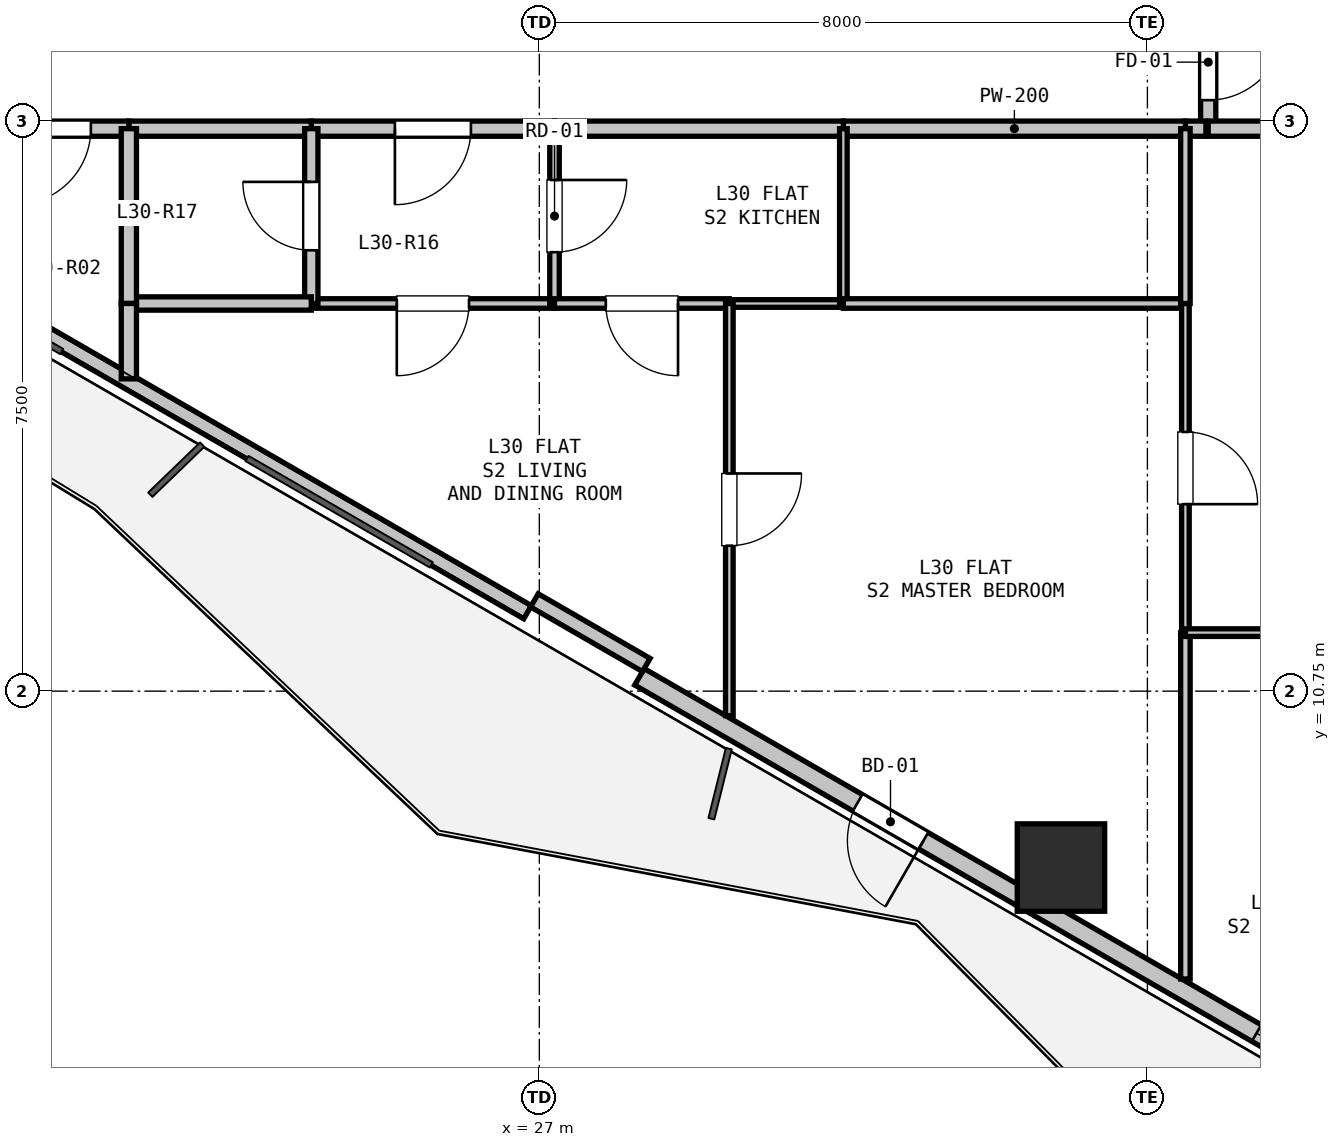
"""IFC4 building model, lengths in metres.
Left out: names, types, materials, properties, quantities, classifications, styles, units other than length and angle.
Written with IfcOpenShell. Run it as: python <this file> out.ifc"""

import sys

from ifc_helpers import new_model, si_unit, direction, frame, frame_2d, origin, origin_2d, place, context, subcontext, project, spatial, rectangle, hollow_rectangle, extrude, element, fill, save


model = new_model("IFC4")
c1 = context("Model", 3, precision=1e-05, world=origin(), true_north=direction((0.0, 1.0)))
c2 = subcontext(c1, "Body", "Model", "MODEL_VIEW")
j1 = project(units=[si_unit("LENGTHUNIT", "METRE"), si_unit("PLANEANGLEUNIT", "RADIAN")], contexts=[c1])
p1 = place(None, origin())
s1 = spatial("IfcSite", under=j1, at=p1, CompositionType="ELEMENT")
p2 = place(p1, origin())
s2 = spatial("IfcBuilding", under=s1, at=p2, CompositionType="ELEMENT")
p3 = place(p2, frame((0.0, 0.0, 109.8)))
s3 = spatial("IfcBuildingStorey", under=s2, at=p3, CompositionType="ELEMENT", Elevation=109.8)
p4 = place(p3, frame((33.863, 8.429, 0.0), z_axis=(0.0, 0.0, 1.0), x_axis=(1.0, 0.0, 0.0)))
e1 = element("IfcColumn", 1, at=p4, inside=s3, PredefinedType="COLUMN", context=c2, shape_type="SweptSolid", body=[
    extrude(hollow_rectangle(XDim=1.15, YDim=1.15, WallThickness=0.032, at=origin_2d()), origin(), (0.0, 0.0, 1.0), 3.3),
])
p5 = place(p3, frame((38.649, 4.973, 0.0), z_axis=(0.0, 0.0, 1.0), x_axis=(-0.866023023012, 0.500004123596, 0.0)))
e2 = element("IfcWall", 2, at=p5, inside=s3, PredefinedType="SOLIDWALL", context=c2, shape_type="SweptSolid", body=[
    extrude(rectangle(XDim=11.93, YDim=0.25, at=frame_2d((5.965, 0.0))), origin(), (0.0, 0.0, 1.0), 2.67),
])
p6 = place(p5, frame((7.616, 0.0, 0.0)))
e3 = element("IfcOpeningElement", 3, at=p6, cuts=e2, PredefinedType="OPENING", context=c2, shape_type="SweptSolid", body=[
    extrude(rectangle(XDim=1.0, YDim=2.1, at=frame_2d((0.5, 1.05))), frame((0.0, 0.135, 0.0), z_axis=(0.0, -1.0, 0.0), x_axis=(1.0, 0.0, 0.0)), (0.0, 0.0, 1.0), 0.27),
])
p7 = place(p5, frame((1.355, 0.0, 0.9)))
e4 = element("IfcOpeningElement", 4, at=p7, cuts=e2, PredefinedType="OPENING", context=c2, shape_type="SweptSolid", body=[
    extrude(rectangle(XDim=1.2, YDim=1.4, at=frame_2d((0.6, 0.7))), frame((0.0, 0.135, 0.0), z_axis=(0.0, -1.0, 0.0), x_axis=(1.0, 0.0, 0.0)), (0.0, 0.0, 1.0), 0.27),
])
p8 = place(p3, frame((26.845, 11.788, 0.0), z_axis=(0.0, 0.0, 1.0), x_axis=(-0.866027010039, 0.499997217876, 0.0)))
e5 = element("IfcWall", 5, at=p8, inside=s3, PredefinedType="PARAPET", context=c2, shape_type="SweptSolid", body=[
    extrude(rectangle(XDim=11.229, YDim=0.2, at=frame_2d((5.615, 0.0))), origin(), (0.0, 0.0, 1.0), 0.2),
])
p9 = place(p3, frame((28.407, 11.094, 0.0), z_axis=(0.0, 0.0, 1.0), x_axis=(-0.86605165483, 0.499954529098, 0.0)))
e6 = element("IfcWall", 6, at=p9, inside=s3, PredefinedType="PARAPET", context=c2, shape_type="SweptSolid", body=[
    extrude(rectangle(XDim=1.7, YDim=0.2, at=frame_2d((0.85, 0.0))), origin(), (0.0, 0.0, 1.0), 2.67),
])
p10 = place(p3, frame((35.8, 19.9, 0.0), z_axis=(0.0, 0.0, 1.0), x_axis=(0.0, -1.0, 0.0)))
e7 = element("IfcWall", 7, at=p10, inside=s3, PredefinedType="PARTITIONING", context=c2, shape_type="SweptSolid", body=[
    extrude(rectangle(XDim=1.75, YDim=0.2, at=frame_2d((0.875, 0.0))), origin(), (0.0, 0.0, 1.0), 3.05),
])
p11 = place(p10, frame((0.375, 0.0, 0.0)))
e8 = element("IfcOpeningElement", 8, at=p11, cuts=e7, PredefinedType="OPENING", context=c2, shape_type="SweptSolid", body=[
    extrude(rectangle(XDim=1.0, YDim=2.15, at=frame_2d((0.5, 1.075))), frame((0.0, 0.11, 0.0), z_axis=(0.0, -1.0, 0.0), x_axis=(1.0, 0.0, 0.0)), (0.0, 0.0, 1.0), 0.22),
])
p12 = place(p3, frame((35.77, 18.15, 0.0), z_axis=(0.0, 0.0, 1.0), x_axis=(-1.0, 0.0, 0.0)))
e9 = element("IfcWall", 9, at=p12, inside=s3, PredefinedType="PARTITIONING", context=c2, shape_type="SweptSolid", body=[
    extrude(rectangle(XDim=0.27, YDim=0.2, at=frame_2d((0.135, 0.0))), origin(), (0.0, 0.0, 1.0), 3.05),
])
p13 = place(p3, frame((35.5, 18.15, 0.0), z_axis=(0.0, 0.0, 1.0), x_axis=(-1.0, 0.0, 0.0)))
e10 = element("IfcWall", 10, at=p13, inside=s3, PredefinedType="PARTITIONING", context=c2, shape_type="SweptSolid", body=[
    extrude(rectangle(XDim=4.5, YDim=0.2, at=frame_2d((2.25, 0.0))), origin(), (0.0, 0.0, 1.0), 3.05),
])
p14 = place(p3, frame((31.0, 18.15, 0.0), z_axis=(0.0, 0.0, 1.0), x_axis=(-1.0, 0.0, 0.0)))
e11 = element("IfcWall", 11, at=p14, inside=s3, PredefinedType="PARTITIONING", context=c2, shape_type="SweptSolid", body=[
    extrude(rectangle(XDim=3.8, YDim=0.2, at=frame_2d((1.9, 0.0))), origin(), (0.0, 0.0, 1.0), 3.05),
])
p15 = place(p3, frame((27.2, 18.15, 0.0), z_axis=(0.0, 0.0, 1.0), x_axis=(-1.0, 0.0, 0.0)))
e12 = element("IfcWall", 12, at=p15, inside=s3, PredefinedType="PARTITIONING", context=c2, shape_type="SweptSolid", body=[
    extrude(rectangle(XDim=3.2, YDim=0.2, at=frame_2d((1.6, 0.0))), origin(), (0.0, 0.0, 1.0), 2.423),
])
p16 = place(p15, frame((1.1, 0.0, 0.0)))
e13 = element("IfcOpeningElement", 13, at=p16, cuts=e12, PredefinedType="OPENING", context=c2, shape_type="SweptSolid", body=[
    extrude(rectangle(XDim=1.0, YDim=2.15, at=frame_2d((0.5, 1.075))), frame((0.0, 0.11, 0.0), z_axis=(0.0, -1.0, 0.0), x_axis=(1.0, 0.0, 0.0)), (0.0, 0.0, 1.0), 0.22),
])
p17 = place(p3, frame((24.0, 18.15, 0.0), z_axis=(0.0, 0.0, 1.0), x_axis=(-1.0, 0.0, 0.0)))
e14 = element("IfcWall", 14, at=p17, inside=s3, PredefinedType="PARTITIONING", context=c2, shape_type="SweptSolid", body=[
    extrude(rectangle(XDim=2.4, YDim=0.2, at=frame_2d((1.2, 0.0))), origin(), (0.0, 0.0, 1.0), 2.423),
])
p18 = place(p3, frame((21.6, 18.15, 0.0), z_axis=(0.0, 0.0, 1.0), x_axis=(-1.0, 0.0, 0.0)))
e15 = element("IfcWall", 15, at=p18, inside=s3, PredefinedType="PARTITIONING", context=c2, shape_type="SweptSolid", body=[
    extrude(rectangle(XDim=2.0, YDim=0.2, at=frame_2d((1.0, 0.0))), origin(), (0.0, 0.0, 1.0), 3.05),
])
p19 = place(p18, frame((0.5, 0.0, 0.0)))
e16 = element("IfcOpeningElement", 16, at=p19, cuts=e15, PredefinedType="OPENING", context=c2, shape_type="SweptSolid", body=[
    extrude(rectangle(XDim=1.0, YDim=2.15, at=frame_2d((0.5, 1.075))), frame((0.0, 0.11, 0.0), z_axis=(0.0, -1.0, 0.0), x_axis=(1.0, 0.0, 0.0)), (0.0, 0.0, 1.0), 0.22),
])
p20 = place(p3, frame((38.4, 18.15, 0.0), z_axis=(0.0, 0.0, 1.0), x_axis=(-1.0, 0.0, 0.0)))
e17 = element("IfcWall", 17, at=p20, inside=s3, PredefinedType="PARTITIONING", context=c2, shape_type="SweptSolid", body=[
    extrude(rectangle(XDim=2.6, YDim=0.2, at=frame_2d((1.3, 0.0))), origin(), (0.0, 0.0, 1.0), 2.423),
])
p21 = place(p3, frame((27.2, 15.85, 0.0), z_axis=(0.0, 0.0, 1.0), x_axis=(-1.0, 0.0, 0.0)))
e18 = element("IfcWall", 18, at=p21, inside=s3, PredefinedType="PARTITIONING", context=c2, shape_type="SweptSolid", body=[
    extrude(rectangle(XDim=3.2, YDim=0.125, at=frame_2d((1.6, 0.0))), origin(), (0.0, 0.0, 1.0), 2.423),
])
p22 = place(p21, frame((1.125, 0.0, 0.0)))
e19 = element("IfcOpeningElement", 19, at=p22, cuts=e18, PredefinedType="OPENING", context=c2, shape_type="SweptSolid", body=[
    extrude(rectangle(XDim=0.95, YDim=2.1, at=frame_2d((0.475, 1.05))), frame((0.0, 0.073, 0.0), z_axis=(0.0, -1.0, 0.0), x_axis=(1.0, 0.0, 0.0)), (0.0, 0.0, 1.0), 0.145),
])
p23 = place(p3, frame((24.0, 15.85, 0.0), z_axis=(0.0, 0.0, 1.0), x_axis=(0.0, 1.0, 0.0)))
e20 = element("IfcWall", 20, at=p23, inside=s3, PredefinedType="PLUMBINGWALL", context=c2, shape_type="SweptSolid", body=[
    extrude(rectangle(XDim=2.3, YDim=0.175, at=frame_2d((1.15, 0.0))), origin(), (0.0, 0.0, 1.0), 2.423),
])
p24 = place(p23, frame((0.7, 0.0, 0.0)))
e21 = element("IfcOpeningElement", 21, at=p24, cuts=e20, PredefinedType="OPENING", context=c2, shape_type="SweptSolid", body=[
    extrude(rectangle(XDim=0.9, YDim=2.1, at=frame_2d((0.45, 1.05))), frame((0.0, 0.097, 0.0), z_axis=(0.0, -1.0, 0.0), x_axis=(1.0, 0.0, 0.0)), (0.0, 0.0, 1.0), 0.195),
])
p25 = place(p3, frame((27.2, 18.15, 0.0), z_axis=(0.0, 0.0, 1.0), x_axis=(0.0, -1.0, 0.0)))
e22 = element("IfcWall", 22, at=p25, inside=s3, PredefinedType="PARTITIONING", context=c2, shape_type="SweptSolid", body=[
    extrude(rectangle(XDim=2.3, YDim=0.125, at=frame_2d((1.15, 0.0))), origin(), (0.0, 0.0, 1.0), 3.05),
])
p26 = place(p25, frame((0.675, 0.0, 0.0)))
e23 = element("IfcOpeningElement", 23, at=p26, cuts=e22, PredefinedType="OPENING", context=c2, shape_type="SweptSolid", body=[
    extrude(rectangle(XDim=0.95, YDim=2.1, at=frame_2d((0.475, 1.05))), frame((0.0, 0.073, 0.0), z_axis=(0.0, -1.0, 0.0), x_axis=(1.0, 0.0, 0.0)), (0.0, 0.0, 1.0), 0.145),
])
p27 = place(p3, frame((24.0, 15.85, 0.0), z_axis=(0.0, 0.0, 1.0), x_axis=(-1.0, 0.0, 0.0)))
e24 = element("IfcWall", 24, at=p27, inside=s3, PredefinedType="PLUMBINGWALL", context=c2, shape_type="SweptSolid", body=[
    extrude(rectangle(XDim=2.4, YDim=0.175, at=frame_2d((1.2, 0.0))), origin(), (0.0, 0.0, 1.0), 3.05),
])
p28 = place(p3, frame((21.6, 15.85, 0.0), z_axis=(0.0, 0.0, 1.0), x_axis=(0.0, 1.0, 0.0)))
e25 = element("IfcWall", 25, at=p28, inside=s3, PredefinedType="PARTITIONING", context=c2, shape_type="SweptSolid", body=[
    extrude(rectangle(XDim=2.3, YDim=0.2, at=frame_2d((1.15, 0.0))), origin(), (0.0, 0.0, 1.0), 3.05),
])
p29 = place(p3, frame((31.0, 15.85, 0.0), z_axis=(0.0, 0.0, 1.0), x_axis=(-1.0, 0.0, 0.0)))
e26 = element("IfcWall", 26, at=p29, inside=s3, PredefinedType="PARTITIONING", context=c2, shape_type="SweptSolid", body=[
    extrude(rectangle(XDim=1.5, YDim=0.1, at=frame_2d((0.75, 0.0))), origin(), (0.0, 0.0, 1.0), 3.05),
])
p30 = place(p3, frame((29.5, 15.85, 0.0), z_axis=(0.0, 0.0, 1.0), x_axis=(-1.0, 0.0, 0.0)))
e27 = element("IfcWall", 27, at=p30, inside=s3, PredefinedType="PARTITIONING", context=c2, shape_type="SweptSolid", body=[
    extrude(rectangle(XDim=2.3, YDim=0.125, at=frame_2d((1.15, 0.0))), origin(), (0.0, 0.0, 1.0), 3.05),
])
p31 = place(p30, frame((0.675, 0.0, 0.0)))
e28 = element("IfcOpeningElement", 28, at=p31, cuts=e27, PredefinedType="OPENING", context=c2, shape_type="SweptSolid", body=[
    extrude(rectangle(XDim=0.95, YDim=2.1, at=frame_2d((0.475, 1.05))), frame((0.0, 0.073, 0.0), z_axis=(0.0, -1.0, 0.0), x_axis=(1.0, 0.0, 0.0)), (0.0, 0.0, 1.0), 0.145),
])
p32 = place(p3, frame((31.0, 18.15, 0.0), z_axis=(0.0, 0.0, 1.0), x_axis=(0.0, -1.0, 0.0)))
e29 = element("IfcWall", 29, at=p32, inside=s3, PredefinedType="PARTITIONING", context=c2, shape_type="SweptSolid", body=[
    extrude(rectangle(XDim=2.3, YDim=0.1, at=frame_2d((1.15, 0.0))), origin(), (0.0, 0.0, 1.0), 3.05),
])
p33 = place(p3, frame((21.6, 15.85, 0.0), z_axis=(0.0, 0.0, 1.0), x_axis=(0.0, -1.0, 0.0)))
e30 = element("IfcWall", 30, at=p33, inside=s3, PredefinedType="PARTITIONING", context=c2, shape_type="SweptSolid", body=[
    extrude(rectangle(XDim=0.992, YDim=0.2, at=frame_2d((0.496, 0.0))), origin(), (0.0, 0.0, 1.0), 2.365),
])
p34 = place(p3, frame((29.5, 15.85, 0.0), z_axis=(0.0, 0.0, 1.0), x_axis=(0.0, -1.0, 0.0)))
e31 = element("IfcWall", 31, at=p34, inside=s3, PredefinedType="PARTITIONING", context=c2, shape_type="SweptSolid", body=[
    extrude(rectangle(XDim=5.423, YDim=0.1, at=frame_2d((2.711, 0.0))), origin(), (0.0, 0.0, 1.0), 2.365),
])
p35 = place(p34, frame((2.236, 0.0, 0.0)))
e32 = element("IfcOpeningElement", 32, at=p35, cuts=e31, PredefinedType="OPENING", context=c2, shape_type="SweptSolid", body=[
    extrude(rectangle(XDim=0.95, YDim=2.1, at=frame_2d((0.475, 1.05))), frame((0.0, 0.06, 0.0), z_axis=(0.0, -1.0, 0.0), x_axis=(1.0, 0.0, 0.0)), (0.0, 0.0, 1.0), 0.12),
])
p36 = place(p3, frame((31.0, 15.85, 0.0), z_axis=(0.0, 0.0, 1.0), x_axis=(1.0, 0.0, 0.0)))
e33 = element("IfcWall", 33, at=p36, inside=s3, PredefinedType="PARTITIONING", context=c2, shape_type="SweptSolid", body=[
    extrude(rectangle(XDim=4.5, YDim=0.125, at=frame_2d((2.25, 0.0))), origin(), (0.0, 0.0, 1.0), 3.05),
])
p37 = place(p3, frame((35.5, 15.85, 0.0), z_axis=(0.0, 0.0, 1.0), x_axis=(0.0, -1.0, 0.0)))
e34 = element("IfcWall", 34, at=p37, inside=s3, PredefinedType="PARTITIONING", context=c2, shape_type="SweptSolid", body=[
    extrude(rectangle(XDim=4.33, YDim=0.1, at=frame_2d((2.165, 0.0))), origin(), (0.0, 0.0, 1.0), 3.05),
])
p38 = place(p37, frame((1.69, 0.0, 0.0)))
e35 = element("IfcOpeningElement", 35, at=p38, cuts=e34, PredefinedType="OPENING", context=c2, shape_type="SweptSolid", body=[
    extrude(rectangle(XDim=0.95, YDim=2.1, at=frame_2d((0.475, 1.05))), frame((0.0, 0.06, 0.0), z_axis=(0.0, -1.0, 0.0), x_axis=(1.0, 0.0, 0.0)), (0.0, 0.0, 1.0), 0.12),
])
p39 = place(p3, frame((35.5, 11.52, 0.0), z_axis=(0.0, 0.0, 1.0), x_axis=(0.0, -1.0, 0.0)))
e36 = element("IfcWall", 36, at=p39, inside=s3, PredefinedType="PARTITIONING", context=c2, shape_type="SweptSolid", body=[
    extrude(rectangle(XDim=4.557, YDim=0.125, at=frame_2d((2.278, 0.0))), origin(), (0.0, 0.0, 1.0), 2.714),
])
p40 = place(p3, frame((35.5, 11.52, 0.0), z_axis=(0.0, 0.0, 1.0), x_axis=(1.0, 0.0, 0.0)))
e37 = element("IfcWall", 37, at=p40, inside=s3, PredefinedType="PARTITIONING", context=c2, shape_type="SweptSolid", body=[
    extrude(rectangle(XDim=3.77, YDim=0.1, at=frame_2d((1.885, 0.0))), origin(), (0.0, 0.0, 1.0), 3.05),
])
p41 = place(p40, frame((1.41, 0.0, 0.0)))
e38 = element("IfcOpeningElement", 38, at=p41, cuts=e37, PredefinedType="OPENING", context=c2, shape_type="SweptSolid", body=[
    extrude(rectangle(XDim=0.95, YDim=2.1, at=frame_2d((0.475, 1.05))), frame((0.0, 0.06, 0.0), z_axis=(0.0, -1.0, 0.0), x_axis=(1.0, 0.0, 0.0)), (0.0, 0.0, 1.0), 0.12),
])
p42 = place(p3, frame((35.5, 15.85, 0.0), z_axis=(0.0, 0.0, 1.0), x_axis=(0.0, 1.0, 0.0)))
e39 = element("IfcWall", 39, at=p42, inside=s3, PredefinedType="PARTITIONING", context=c2, shape_type="SweptSolid", body=[
    extrude(rectangle(XDim=2.3, YDim=0.125, at=frame_2d((1.15, 0.0))), origin(), (0.0, 0.0, 1.0), 3.05),
])
p43 = place(p6, origin())
e40 = element("IfcDoor", 40, at=p43, inside=s3, OperationType="SINGLE_SWING_LEFT", PredefinedType="DOOR", context=c2, shape_type="SweptSolid", body=[
    extrude(rectangle(XDim=1.0, YDim=2.1, at=frame_2d((0.5, 1.05))), frame((0.0, 0.025, 0.0), z_axis=(0.0, -1.0, 0.0), x_axis=(1.0, 0.0, 0.0)), (0.0, 0.0, 1.0), 0.05),
])
fill(e3, e40)
p44 = place(p7, origin())
e41 = element("IfcWindow", 41, at=p44, inside=s3, PartitioningType="SINGLE_PANEL", PredefinedType="WINDOW", context=c2, shape_type="SweptSolid", body=[
    extrude(rectangle(XDim=1.2, YDim=1.4, at=frame_2d((0.6, 0.7))), frame((0.0, 0.03, 0.0), z_axis=(0.0, -1.0, 0.0), x_axis=(1.0, 0.0, 0.0)), (0.0, 0.0, 1.0), 0.06),
])
fill(e4, e41)
p45 = place(p11, origin())
e42 = element("IfcDoor", 42, at=p45, inside=s3, OperationType="SINGLE_SWING_LEFT", PredefinedType="DOOR", context=c2, shape_type="SweptSolid", body=[
    extrude(rectangle(XDim=1.0, YDim=2.15, at=frame_2d((0.5, 1.075))), frame((0.0, 0.025, 0.0), z_axis=(0.0, -1.0, 0.0), x_axis=(1.0, 0.0, 0.0)), (0.0, 0.0, 1.0), 0.05),
])
fill(e8, e42)
p46 = place(p16, origin())
e43 = element("IfcDoor", 43, at=p46, inside=s3, OperationType="SINGLE_SWING_RIGHT", PredefinedType="DOOR", context=c2, shape_type="SweptSolid", body=[
    extrude(rectangle(XDim=1.0, YDim=2.15, at=frame_2d((0.5, 1.075))), frame((0.0, 0.025, 0.0), z_axis=(0.0, -1.0, 0.0), x_axis=(1.0, 0.0, 0.0)), (0.0, 0.0, 1.0), 0.05),
])
fill(e13, e43)
p47 = place(p19, origin())
e44 = element("IfcDoor", 44, at=p47, inside=s3, OperationType="SINGLE_SWING_RIGHT", PredefinedType="DOOR", context=c2, shape_type="SweptSolid", body=[
    extrude(rectangle(XDim=1.0, YDim=2.15, at=frame_2d((0.5, 1.075))), frame((0.0, 0.025, 0.0), z_axis=(0.0, -1.0, 0.0), x_axis=(1.0, 0.0, 0.0)), (0.0, 0.0, 1.0), 0.05),
])
fill(e16, e44)
p48 = place(p24, origin())
e45 = element("IfcDoor", 45, at=p48, inside=s3, OperationType="SINGLE_SWING_RIGHT", PredefinedType="DOOR", context=c2, shape_type="SweptSolid", body=[
    extrude(rectangle(XDim=0.9, YDim=2.1, at=frame_2d((0.45, 1.05))), frame((0.0, 0.025, 0.0), z_axis=(0.0, -1.0, 0.0), x_axis=(1.0, 0.0, 0.0)), (0.0, 0.0, 1.0), 0.05),
])
fill(e21, e45)
p49 = place(p26, origin())
e46 = element("IfcDoor", 46, at=p49, inside=s3, OperationType="SINGLE_SWING_LEFT", PredefinedType="DOOR", context=c2, shape_type="SweptSolid", body=[
    extrude(rectangle(XDim=0.95, YDim=2.1, at=frame_2d((0.475, 1.05))), frame((0.0, 0.025, 0.0), z_axis=(0.0, -1.0, 0.0), x_axis=(1.0, 0.0, 0.0)), (0.0, 0.0, 1.0), 0.05),
])
fill(e23, e46)
p50 = place(p22, origin())
e47 = element("IfcDoor", 47, at=p50, inside=s3, OperationType="SINGLE_SWING_RIGHT", PredefinedType="DOOR", context=c2, shape_type="SweptSolid", body=[
    extrude(rectangle(XDim=0.95, YDim=2.1, at=frame_2d((0.475, 1.05))), frame((0.0, 0.025, 0.0), z_axis=(0.0, -1.0, 0.0), x_axis=(1.0, 0.0, 0.0)), (0.0, 0.0, 1.0), 0.05),
])
fill(e19, e47)
p51 = place(p31, origin())
e48 = element("IfcDoor", 48, at=p51, inside=s3, OperationType="SINGLE_SWING_LEFT", PredefinedType="DOOR", context=c2, shape_type="SweptSolid", body=[
    extrude(rectangle(XDim=0.95, YDim=2.1, at=frame_2d((0.475, 1.05))), frame((0.0, 0.025, 0.0), z_axis=(0.0, -1.0, 0.0), x_axis=(1.0, 0.0, 0.0)), (0.0, 0.0, 1.0), 0.05),
])
fill(e28, e48)
p52 = place(p35, origin())
e49 = element("IfcDoor", 49, at=p52, inside=s3, OperationType="SINGLE_SWING_LEFT", PredefinedType="DOOR", context=c2, shape_type="SweptSolid", body=[
    extrude(rectangle(XDim=0.95, YDim=2.1, at=frame_2d((0.475, 1.05))), frame((0.0, 0.025, 0.0), z_axis=(0.0, -1.0, 0.0), x_axis=(1.0, 0.0, 0.0)), (0.0, 0.0, 1.0), 0.05),
])
fill(e32, e49)
p53 = place(p38, origin())
e50 = element("IfcDoor", 50, at=p53, inside=s3, OperationType="SINGLE_SWING_RIGHT", PredefinedType="DOOR", context=c2, shape_type="SweptSolid", body=[
    extrude(rectangle(XDim=0.95, YDim=2.1, at=frame_2d((0.475, 1.05))), frame((0.0, 0.025, 0.0), z_axis=(0.0, -1.0, 0.0), x_axis=(1.0, 0.0, 0.0)), (0.0, 0.0, 1.0), 0.05),
])
fill(e35, e50)
save(model, sys.argv[1])
